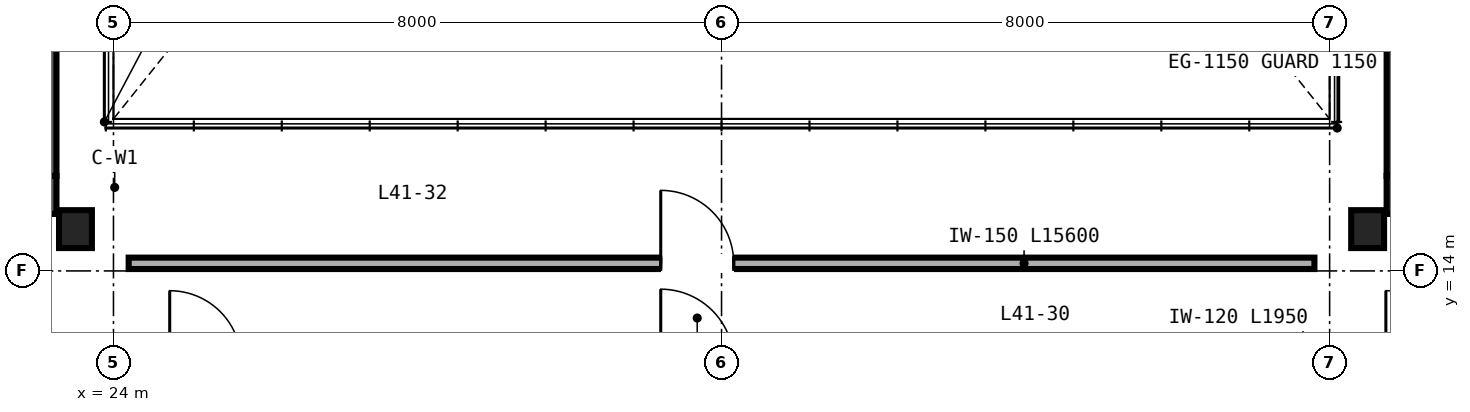
"""IFC4 building model, lengths in metres.
Left out: names, types, materials, properties, quantities, classifications, styles, units other than length and angle.
Written with IfcOpenShell. Run it as: python <this file> out.ifc"""

import sys

from ifc_helpers import new_model, si_unit, direction, frame, frame_2d, origin, origin_2d, place, context, subcontext, project, spatial, rectangle, i_section, extrude, source, transform, mapped, element, fill, save


model = new_model("IFC4")
c1 = context("Model", 3, precision=1e-05, world=origin(), true_north=direction((0.0, 1.0)))
c2 = subcontext(c1, "Body", "Model", "MODEL_VIEW")
j1 = project(units=[si_unit("LENGTHUNIT", "METRE"), si_unit("PLANEANGLEUNIT", "RADIAN")], contexts=[c1])
p1 = place(None, origin())
s1 = spatial("IfcSite", under=j1, at=p1, CompositionType="ELEMENT")
p2 = place(p1, origin())
s2 = spatial("IfcBuilding", under=s1, at=p2, CompositionType="ELEMENT")
p3 = place(p2, frame((0.0, 0.0, 166.8)))
s3 = spatial("IfcBuildingStorey", under=s2, at=p3, CompositionType="ELEMENT", Elevation=166.8)
p4 = place(p3, frame((10.75, 15.0, 0.0), z_axis=(0.0, 0.0, 1.0), x_axis=(1.0, 0.0, 0.0)))
e1 = element("IfcWall", 1, at=p4, inside=s3, PredefinedType="SHEAR", context=c2, shape_type="SweptSolid", body=[
    extrude(rectangle(XDim=12.5, YDim=0.5, at=frame_2d((6.25, 0.0))), origin(), (0.0, 0.0, 1.0), 3.37),
])
p5 = place(p4, frame((8.83, 0.0, 0.0)))
e2 = element("IfcOpeningElement", 2, at=p5, cuts=e1, PredefinedType="OPENING", context=c2, shape_type="SweptSolid", body=[
    extrude(rectangle(XDim=1.0, YDim=2.15, at=frame_2d((0.5, 1.075))), frame((0.0, 0.26, 0.0), z_axis=(0.0, -1.0, 0.0), x_axis=(1.0, 0.0, 0.0)), (0.0, 0.0, 1.0), 0.52),
])
p6 = place(p3, frame((23.0, 15.25, 0.0), z_axis=(0.0, 0.0, 1.0), x_axis=(0.0, 1.0, 0.0)))
e3 = element("IfcWall", 3, at=p6, inside=s3, PredefinedType="SHEAR", context=c2, shape_type="SweptSolid", body=[
    extrude(rectangle(XDim=21.5, YDim=0.5, at=frame_2d((10.75, 0.0))), origin(), (0.0, 0.0, 1.0), 3.37),
])
p7 = place(p3, frame((40.75, 15.0, 0.0), z_axis=(0.0, 0.0, 1.0), x_axis=(1.0, 0.0, 0.0)))
e4 = element("IfcWall", 4, at=p7, inside=s3, PredefinedType="SHEAR", context=c2, shape_type="SweptSolid", body=[
    extrude(rectangle(XDim=12.5, YDim=0.5, at=frame_2d((6.25, 0.0))), origin(), (0.0, 0.0, 1.0), 3.37),
])
p8 = place(p7, frame((4.35, 0.0, 0.0)))
e5 = element("IfcOpeningElement", 5, at=p8, cuts=e4, PredefinedType="OPENING", context=c2, shape_type="SweptSolid", body=[
    extrude(rectangle(XDim=1.0, YDim=2.15, at=frame_2d((0.5, 1.075))), frame((0.0, 0.26, 0.0), z_axis=(0.0, -1.0, 0.0), x_axis=(1.0, 0.0, 0.0)), (0.0, 0.0, 1.0), 0.52),
])
p9 = place(p3, frame((41.0, 15.25, 0.0), z_axis=(0.0, 0.0, 1.0), x_axis=(0.0, 1.0, 0.0)))
e6 = element("IfcWall", 6, at=p9, inside=s3, PredefinedType="SHEAR", context=c2, shape_type="SweptSolid", body=[
    extrude(rectangle(XDim=21.5, YDim=0.5, at=frame_2d((10.75, 0.0))), origin(), (0.0, 0.0, 1.0), 3.37),
])
m1 = source(origin(), c2, "Body", "SweptSolid", [
    extrude(i_section(OverallWidth=0.432, OverallDepth=0.498, WebThickness=0.056, FlangeThickness=0.089, FilletRadius=0.025, at=origin_2d()), origin(), (0.0, 0.0, 1.0), 3.37),
])
for number, where, z_axis, x_axis in (
    (7, (23.5, 14.55, 0.0), (0.0, 0.0, 1.0), (1.0, 0.0, 0.0)),
    (8, (40.5, 14.55, 0.0), (0.0, 0.0, 1.0), (1.0, 0.0, 0.0)),
):
    element("IfcColumn", number, at=place(p3, frame(where, z_axis=z_axis, x_axis=x_axis)), inside=s3, PredefinedType="COLUMN", context=c2, shape_type="MappedRepresentation", body=[
        mapped(m1, transform((0.0, 0.0, 0.0), scale=1.0)),
    ])
p10 = place(p3, frame((24.2, 14.1, 0.0), z_axis=(0.0, 0.0, 1.0), x_axis=(1.0, 0.0, 0.0)))
e9 = element("IfcWall", 9, at=p10, inside=s3, PredefinedType="PARTITIONING", context=c2, shape_type="SweptSolid", body=[
    extrude(rectangle(XDim=15.6, YDim=0.15, at=frame_2d((7.8, 0.0))), origin(), (0.0, 0.0, 1.0), 3.37),
])
p11 = place(p10, frame((7.0, 0.0, 0.0)))
e10 = element("IfcOpeningElement", 10, at=p11, cuts=e9, PredefinedType="OPENING", context=c2, shape_type="SweptSolid", body=[
    extrude(rectangle(XDim=0.96, YDim=2.15, at=frame_2d((0.48, 1.075))), frame((0.0, 0.085, 0.0), z_axis=(0.0, -1.0, 0.0), x_axis=(1.0, 0.0, 0.0)), (0.0, 0.0, 1.0), 0.17),
])
m2 = source(origin(), c2, "Body", "SweptSolid", [
    extrude(rectangle(XDim=0.96, YDim=2.15, at=frame_2d((0.48, 1.075))), frame((0.0, 0.025, 0.0), z_axis=(0.0, -1.0, 0.0), x_axis=(1.0, 0.0, 0.0)), (0.0, 0.0, 1.0), 0.05),
])
p12 = place(p11, origin())
e11 = element("IfcDoor", 11, at=p12, inside=s3, OperationType="SINGLE_SWING_LEFT", PredefinedType="DOOR", context=c2, shape_type="MappedRepresentation", body=[
    mapped(m2, transform((0.0, 0.0, 0.0), scale=1.0)),
])
fill(e10, e11)
save(model, sys.argv[1])
